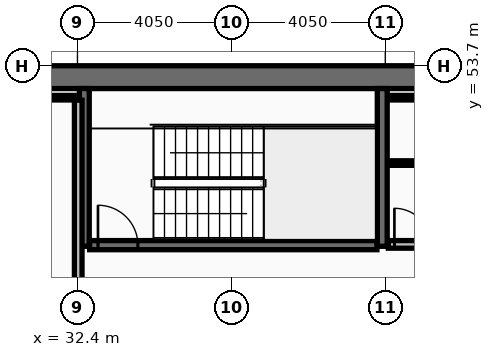
"""IFC4 building model, lengths in metres.
Left out: names, types, materials, properties, quantities, classifications, styles, units other than length and angle.
Written with IfcOpenShell. Run it as: python <this file> out.ifc"""

import sys

from ifc_helpers import new_model, si_unit, direction, frame, frame_2d, origin, place, context, subcontext, project, spatial, rectangle, extrude, element, fill, save


model = new_model("IFC4")
c1 = context("Model", 3, precision=1e-05, world=origin(), true_north=direction((0.0, 1.0)))
c2 = subcontext(c1, "Body", "Model", "MODEL_VIEW")
j1 = project(units=[si_unit("LENGTHUNIT", "METRE"), si_unit("PLANEANGLEUNIT", "RADIAN")], contexts=[c1])
p1 = place(None, origin())
s1 = spatial("IfcSite", under=j1, at=p1, CompositionType="ELEMENT")
p2 = place(p1, origin())
s2 = spatial("IfcBuilding", under=s1, at=p2, CompositionType="ELEMENT")
p3 = place(p2, frame((0.0, 0.0, 206.6)))
s3 = spatial("IfcBuildingStorey", under=s2, at=p3, CompositionType="ELEMENT", Elevation=206.6)
p4 = place(p3, frame((16.2, 53.4, 0.0), z_axis=(0.0, 0.0, 1.0), x_axis=(1.0, 0.0, 0.0)))
e1 = element("IfcWall", 1, at=p4, inside=s3, PredefinedType="SHEAR", context=c2, shape_type="SweptSolid", body=[
    extrude(rectangle(XDim=40.5, YDim=0.6, at=frame_2d((20.25, 0.0))), origin(), (0.0, 0.0, 1.0), 3.44),
])
for number, where, z_axis, x_axis in (
    (2, (32.58, 48.95, 0.0), (0.0, 0.0, 1.0), (0.0, 1.0, 0.0)),
    (3, (40.42, 48.95, 0.0), (0.0, 0.0, 1.0), (0.0, 1.0, 0.0)),
):
    element("IfcWall", number, at=place(p3, frame(where, z_axis=z_axis, x_axis=x_axis)), inside=s3, PredefinedType="SHEAR", context=c2, shape_type="SweptSolid", body=[
        extrude(rectangle(XDim=4.15, YDim=0.26, at=frame_2d((2.075, 0.0))), origin(), (0.0, 0.0, 1.0), 3.44),
    ])
p5 = place(p3, frame((32.72, 48.98, 0.0), z_axis=(0.0, 0.0, 1.0), x_axis=(1.0, 0.0, 0.0)))
e4 = element("IfcWall", 4, at=p5, inside=s3, PredefinedType="SHEAR", context=c2, shape_type="SweptSolid", body=[
    extrude(rectangle(XDim=7.56, YDim=0.24, at=frame_2d((3.78, 0.0))), origin(), (0.0, 0.0, 1.0), 3.44),
])
p6 = place(p5, frame((0.22, 0.0, 0.0)))
e5 = element("IfcOpeningElement", 5, at=p6, cuts=e4, PredefinedType="OPENING", context=c2, shape_type="SweptSolid", body=[
    extrude(rectangle(XDim=1.05, YDim=2.15, at=frame_2d((0.525, 1.075))), frame((0.0, 0.13, 0.0), z_axis=(0.0, -1.0, 0.0), x_axis=(1.0, 0.0, 0.0)), (0.0, 0.0, 1.0), 0.26),
])
p7 = place(p3, frame((32.42, 46.805, 0.0), z_axis=(0.0, 0.0, 1.0), x_axis=(0.0, 1.0, 0.0)))
e6 = element("IfcWall", 6, at=p7, inside=s3, PredefinedType="PARTITIONING", context=c2, shape_type="SweptSolid", body=[
    extrude(rectangle(XDim=5.99, YDim=0.2, at=frame_2d((2.995, 0.0))), origin(), (0.0, 0.0, 1.0), 3.44),
])
p8 = place(p3, frame((24.805, 52.86, 0.0), z_axis=(0.0, 0.0, 1.0), x_axis=(1.0, 0.0, 0.0)))
e7 = element("IfcWall", 7, at=p8, inside=s3, PredefinedType="PARTITIONING", context=c2, shape_type="SweptSolid", body=[
    extrude(rectangle(XDim=7.51, YDim=0.12, at=frame_2d((3.755, 0.0))), origin(), (0.0, 0.0, 1.0), 3.44),
])
p9 = place(p3, frame((40.58, 52.86, 0.0), z_axis=(0.0, 0.0, 1.0), x_axis=(1.0, 0.0, 0.0)))
e8 = element("IfcWall", 8, at=p9, inside=s3, PredefinedType="PARTITIONING", context=c2, shape_type="SweptSolid", body=[
    extrude(rectangle(XDim=7.56, YDim=0.12, at=frame_2d((3.78, 0.0))), origin(), (0.0, 0.0, 1.0), 3.44),
])
p10 = place(p3, frame((40.58, 49.0, 0.0), z_axis=(0.0, 0.0, 1.0), x_axis=(1.0, 0.0, 0.0)))
e9 = element("IfcWall", 9, at=p10, inside=s3, PredefinedType="PARTITIONING", context=c2, shape_type="SweptSolid", body=[
    extrude(rectangle(XDim=7.56, YDim=0.2, at=frame_2d((3.78, 0.0))), origin(), (0.0, 0.0, 1.0), 3.44),
])
p11 = place(p10, frame((0.16, 0.0, 0.0)))
e10 = element("IfcOpeningElement", 10, at=p11, cuts=e9, PredefinedType="OPENING", context=c2, shape_type="SweptSolid", body=[
    extrude(rectangle(XDim=0.95, YDim=2.1, at=frame_2d((0.475, 1.05))), frame((0.0, 0.11, 0.0), z_axis=(0.0, -1.0, 0.0), x_axis=(1.0, 0.0, 0.0)), (0.0, 0.0, 1.0), 0.22),
])
p12 = place(p3, frame((40.63, 51.14, 0.0), z_axis=(0.0, 0.0, 1.0), x_axis=(1.0, 0.0, 0.0)))
e11 = element("IfcWall", 11, at=p12, inside=s3, PredefinedType="PARTITIONING", context=c2, shape_type="SweptSolid", body=[
    extrude(rectangle(XDim=7.46, YDim=0.12, at=frame_2d((3.73, 0.0))), origin(), (0.0, 0.0, 1.0), 3.44),
])
p13 = place(p12, frame((2.4, 0.0, 0.0)))
e12 = element("IfcOpeningElement", 12, at=p13, cuts=e11, PredefinedType="OPENING", context=c2, shape_type="SweptSolid", body=[
    extrude(rectangle(XDim=0.9, YDim=2.05, at=frame_2d((0.45, 1.025))), frame((0.0, 0.07, 0.0), z_axis=(0.0, -1.0, 0.0), x_axis=(1.0, 0.0, 0.0)), (0.0, 0.0, 1.0), 0.14),
])
p14 = place(p6, origin())
e13 = element("IfcDoor", 13, at=p14, inside=s3, OperationType="SINGLE_SWING_LEFT", PredefinedType="DOOR", context=c2, shape_type="SweptSolid", body=[
    extrude(rectangle(XDim=1.05, YDim=2.15, at=frame_2d((0.525, 1.075))), frame((0.0, 0.025, 0.0), z_axis=(0.0, -1.0, 0.0), x_axis=(1.0, 0.0, 0.0)), (0.0, 0.0, 1.0), 0.05),
])
fill(e5, e13)
p15 = place(p11, origin())
e14 = element("IfcDoor", 14, at=p15, inside=s3, OperationType="SINGLE_SWING_LEFT", PredefinedType="DOOR", context=c2, shape_type="SweptSolid", body=[
    extrude(rectangle(XDim=0.95, YDim=2.1, at=frame_2d((0.475, 1.05))), frame((0.0, 0.025, 0.0), z_axis=(0.0, -1.0, 0.0), x_axis=(1.0, 0.0, 0.0)), (0.0, 0.0, 1.0), 0.05),
])
fill(e10, e14)
save(model, sys.argv[1])
